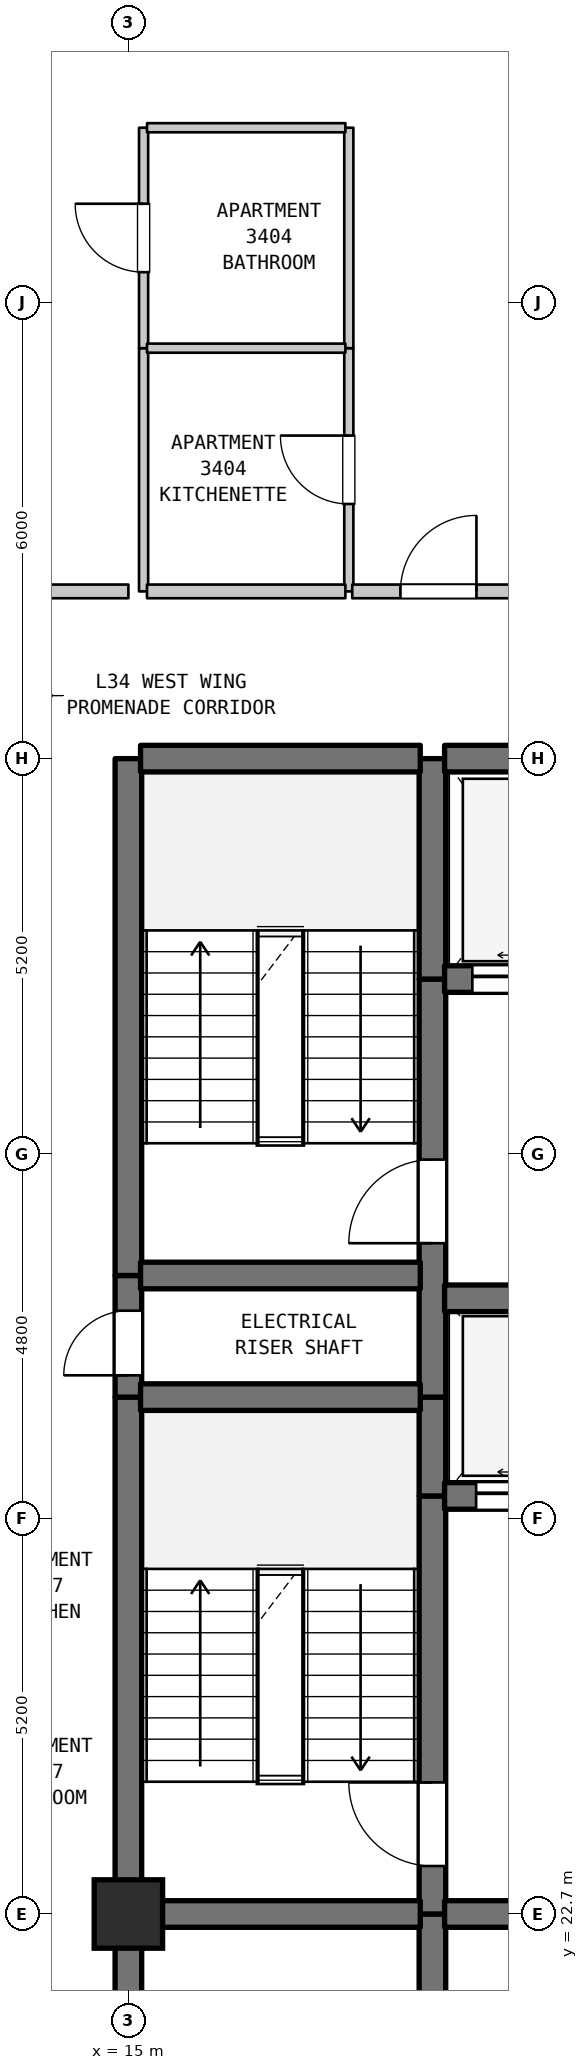
"""IFC4 building model, lengths in metres.
Left out: names, types, materials, properties, quantities, classifications, styles, units other than length and angle.
Written with IfcOpenShell. Run it as: python <this file> out.ifc"""

import sys

from ifc_helpers import new_model, si_unit, direction, frame, frame_2d, origin, origin_2d, place, context, subcontext, project, spatial, rectangle, extrude, element, fill, save


model = new_model("IFC4")
c1 = context("Model", 3, precision=1e-05, world=origin(), true_north=direction((0.0, 1.0)))
c2 = subcontext(c1, "Body", "Model", "MODEL_VIEW")
j1 = project(units=[si_unit("LENGTHUNIT", "METRE"), si_unit("PLANEANGLEUNIT", "RADIAN")], contexts=[c1])
p1 = place(None, origin())
s1 = spatial("IfcSite", under=j1, at=p1, CompositionType="ELEMENT")
p2 = place(p1, origin())
s2 = spatial("IfcBuilding", under=s1, at=p2, CompositionType="ELEMENT")
p3 = place(p2, frame((0.0, 0.0, 140.9)))
s3 = spatial("IfcBuildingStorey", under=s2, at=p3, CompositionType="ELEMENT", Elevation=140.9)
p4 = place(p3, frame((15.0, 22.7, 0.0), z_axis=(0.0, 0.0, 1.0), x_axis=(1.0, 0.0, 0.0)))
e1 = element("IfcColumn", 1, at=p4, inside=s3, PredefinedType="COLUMN", context=c2, shape_type="SweptSolid", body=[
    extrude(rectangle(XDim=0.9, YDim=0.9, at=origin_2d()), origin(), (0.0, 0.0, 1.0), 3.7),
])
p5 = place(p3, frame((15.0, 19.5, 0.0), z_axis=(0.0, 0.0, 1.0), x_axis=(0.0, 1.0, 0.0)))
e2 = element("IfcWall", 2, at=p5, inside=s3, PredefinedType="SHEAR", context=c2, shape_type="SweptSolid", body=[
    extrude(rectangle(XDim=3.2, YDim=0.35, at=frame_2d((1.6, 0.0))), origin(), (0.0, 0.0, 1.0), 3.385),
])
p6 = place(p3, frame((15.0, 22.7, 0.0), z_axis=(0.0, 0.0, 1.0), x_axis=(0.0, 1.0, 0.0)))
e3 = element("IfcWall", 3, at=p6, inside=s3, PredefinedType="SHEAR", context=c2, shape_type="SweptSolid", body=[
    extrude(rectangle(XDim=6.8, YDim=0.35, at=frame_2d((3.4, 0.0))), origin(), (0.0, 0.0, 1.0), 3.385),
])
p7 = place(p3, frame((15.0, 29.5, 0.0), z_axis=(0.0, 0.0, 1.0), x_axis=(0.0, 1.0, 0.0)))
e4 = element("IfcWall", 4, at=p7, inside=s3, PredefinedType="SHEAR", context=c2, shape_type="SweptSolid", body=[
    extrude(rectangle(XDim=1.6, YDim=0.35, at=frame_2d((0.8, 0.0))), origin(), (0.0, 0.0, 1.0), 3.385),
])
p8 = place(p7, frame((0.287, 0.0, 0.0)))
e5 = element("IfcOpeningElement", 5, at=p8, cuts=e4, PredefinedType="OPENING", context=c2, shape_type="SweptSolid", body=[
    extrude(rectangle(XDim=0.85, YDim=2.1, at=frame_2d((0.425, 1.05))), frame((0.0, 0.185, 0.0), z_axis=(0.0, -1.0, 0.0), x_axis=(1.0, 0.0, 0.0)), (0.0, 0.0, 1.0), 0.37),
])
p9 = place(p3, frame((15.0, 31.1, 0.0), z_axis=(0.0, 0.0, 1.0), x_axis=(0.0, 1.0, 0.0)))
e6 = element("IfcWall", 6, at=p9, inside=s3, PredefinedType="SHEAR", context=c2, shape_type="SweptSolid", body=[
    extrude(rectangle(XDim=6.8, YDim=0.35, at=frame_2d((3.4, 0.0))), origin(), (0.0, 0.0, 1.0), 3.385),
])
p10 = place(p3, frame((15.2, 40.1, 0.0), z_axis=(0.0, 0.0, 1.0), x_axis=(0.0, 1.0, 0.0)))
e7 = element("IfcWall", 7, at=p10, inside=s3, PredefinedType="PARTITIONING", context=c2, shape_type="SweptSolid", body=[
    extrude(rectangle(XDim=3.2, YDim=0.12, at=frame_2d((1.6, 0.0))), origin(), (0.0, 0.0, 1.0), 3.385),
])
p11 = place(p3, frame((15.2, 43.3, 0.0), z_axis=(0.0, 0.0, 1.0), x_axis=(0.0, 1.0, 0.0)))
e8 = element("IfcWall", 8, at=p11, inside=s3, PredefinedType="PARTITIONING", context=c2, shape_type="SweptSolid", body=[
    extrude(rectangle(XDim=2.9, YDim=0.12, at=frame_2d((1.45, 0.0))), origin(), (0.0, 0.0, 1.0), 3.385),
])
p12 = place(p11, frame((1.0, 0.0, 0.0)))
e9 = element("IfcOpeningElement", 9, at=p12, cuts=e8, PredefinedType="OPENING", context=c2, shape_type="SweptSolid", body=[
    extrude(rectangle(XDim=0.9, YDim=2.1, at=frame_2d((0.45, 1.05))), frame((0.0, 0.07, 0.0), z_axis=(0.0, -1.0, 0.0), x_axis=(1.0, 0.0, 0.0)), (0.0, 0.0, 1.0), 0.14),
])
p13 = place(p3, frame((17.9, 40.1, 0.0), z_axis=(0.0, 0.0, 1.0), x_axis=(0.0, 1.0, 0.0)))
e10 = element("IfcWall", 10, at=p13, inside=s3, PredefinedType="PARTITIONING", context=c2, shape_type="SweptSolid", body=[
    extrude(rectangle(XDim=3.2, YDim=0.12, at=frame_2d((1.6, 0.0))), origin(), (0.0, 0.0, 1.0), 3.385),
])
p14 = place(p13, frame((1.15, 0.0, 0.0)))
e11 = element("IfcOpeningElement", 11, at=p14, cuts=e10, PredefinedType="OPENING", context=c2, shape_type="SweptSolid", body=[
    extrude(rectangle(XDim=0.9, YDim=2.15, at=frame_2d((0.45, 1.075))), frame((0.0, 0.07, 0.0), z_axis=(0.0, -1.0, 0.0), x_axis=(1.0, 0.0, 0.0)), (0.0, 0.0, 1.0), 0.14),
])
p15 = place(p3, frame((17.9, 43.3, 0.0), z_axis=(0.0, 0.0, 1.0), x_axis=(0.0, 1.0, 0.0)))
e12 = element("IfcWall", 12, at=p15, inside=s3, PredefinedType="PARTITIONING", context=c2, shape_type="SweptSolid", body=[
    extrude(rectangle(XDim=2.9, YDim=0.12, at=frame_2d((1.45, 0.0))), origin(), (0.0, 0.0, 1.0), 3.385),
])
p16 = place(p3, frame((19.0, 19.5, 0.0), z_axis=(0.0, 0.0, 1.0), x_axis=(0.0, 1.0, 0.0)))
e13 = element("IfcWall", 13, at=p16, inside=s3, PredefinedType="SHEAR", context=c2, shape_type="SweptSolid", body=[
    extrude(rectangle(XDim=3.2, YDim=0.35, at=frame_2d((1.6, 0.0))), origin(), (0.0, 0.0, 1.0), 3.385),
])
p17 = place(p3, frame((19.0, 22.7, 0.0), z_axis=(0.0, 0.0, 1.0), x_axis=(0.0, 1.0, 0.0)))
e14 = element("IfcWall", 14, at=p17, inside=s3, PredefinedType="SHEAR", context=c2, shape_type="SweptSolid", body=[
    extrude(rectangle(XDim=5.5, YDim=0.35, at=frame_2d((2.75, 0.0))), origin(), (0.0, 0.0, 1.0), 3.385),
])
p18 = place(p17, frame((0.631, 0.0, 0.0)))
e15 = element("IfcOpeningElement", 15, at=p18, cuts=e14, PredefinedType="OPENING", context=c2, shape_type="SweptSolid", body=[
    extrude(rectangle(XDim=1.1, YDim=2.15, at=frame_2d((0.55, 1.075))), frame((0.0, 0.185, 0.0), z_axis=(0.0, -1.0, 0.0), x_axis=(1.0, 0.0, 0.0)), (0.0, 0.0, 1.0), 0.37),
])
p19 = place(p3, frame((19.0, 28.2, 0.0), z_axis=(0.0, 0.0, 1.0), x_axis=(0.0, 1.0, 0.0)))
e16 = element("IfcWall", 16, at=p19, inside=s3, PredefinedType="SHEAR", context=c2, shape_type="SweptSolid", body=[
    extrude(rectangle(XDim=1.3, YDim=0.35, at=frame_2d((0.65, 0.0))), origin(), (0.0, 0.0, 1.0), 3.385),
])
p20 = place(p3, frame((19.0, 29.5, 0.0), z_axis=(0.0, 0.0, 1.0), x_axis=(0.0, 1.0, 0.0)))
e17 = element("IfcWall", 17, at=p20, inside=s3, PredefinedType="SHEAR", context=c2, shape_type="SweptSolid", body=[
    extrude(rectangle(XDim=5.5, YDim=0.35, at=frame_2d((2.75, 0.0))), origin(), (0.0, 0.0, 1.0), 3.385),
])
p21 = place(p20, frame((2.025, 0.0, 0.0)))
e18 = element("IfcOpeningElement", 18, at=p21, cuts=e17, PredefinedType="OPENING", context=c2, shape_type="SweptSolid", body=[
    extrude(rectangle(XDim=1.1, YDim=2.15, at=frame_2d((0.55, 1.075))), frame((0.0, 0.185, 0.0), z_axis=(0.0, -1.0, 0.0), x_axis=(1.0, 0.0, 0.0)), (0.0, 0.0, 1.0), 0.37),
])
p22 = place(p3, frame((19.0, 35.0, 0.0), z_axis=(0.0, 0.0, 1.0), x_axis=(0.0, 1.0, 0.0)))
e19 = element("IfcWall", 19, at=p22, inside=s3, PredefinedType="SHEAR", context=c2, shape_type="SweptSolid", body=[
    extrude(rectangle(XDim=2.9, YDim=0.35, at=frame_2d((1.45, 0.0))), origin(), (0.0, 0.0, 1.0), 3.385),
])
p23 = place(p3, frame((15.16, 22.7, 0.0), z_axis=(0.0, 0.0, 1.0), x_axis=(1.0, 0.0, 0.0)))
e20 = element("IfcWall", 20, at=p23, inside=s3, PredefinedType="SHEAR", context=c2, shape_type="SweptSolid", body=[
    extrude(rectangle(XDim=3.68, YDim=0.35, at=frame_2d((1.84, 0.0))), origin(), (0.0, 0.0, 1.0), 3.385),
])
p24 = place(p3, frame((19.16, 22.7, 0.0), z_axis=(0.0, 0.0, 1.0), x_axis=(1.0, 0.0, 0.0)))
e21 = element("IfcWall", 21, at=p24, inside=s3, PredefinedType="SHEAR", context=c2, shape_type="SweptSolid", body=[
    extrude(rectangle(XDim=4.48, YDim=0.35, at=frame_2d((2.24, 0.0))), origin(), (0.0, 0.0, 1.0), 3.385),
])
p25 = place(p24, frame((1.64, 0.0, 0.0)))
e22 = element("IfcOpeningElement", 22, at=p25, cuts=e21, PredefinedType="OPENING", context=c2, shape_type="SweptSolid", body=[
    extrude(rectangle(XDim=1.2, YDim=2.2, at=frame_2d((0.6, 1.1))), frame((0.0, 0.185, 0.0), z_axis=(0.0, -1.0, 0.0), x_axis=(1.0, 0.0, 0.0)), (0.0, 0.0, 1.0), 0.37),
])
p26 = place(p3, frame((19.16, 28.2, 0.0), z_axis=(0.0, 0.0, 1.0), x_axis=(1.0, 0.0, 0.0)))
e23 = element("IfcWall", 23, at=p26, inside=s3, PredefinedType="SHEAR", context=c2, shape_type="SweptSolid", body=[
    extrude(rectangle(XDim=4.48, YDim=0.35, at=frame_2d((2.24, 0.0))), origin(), (0.0, 0.0, 1.0), 3.385),
])
p27 = place(p26, frame((0.415, 0.0, 0.0)))
e24 = element("IfcOpeningElement", 24, at=p27, cuts=e23, PredefinedType="OPENING", context=c2, shape_type="SweptSolid", body=[
    extrude(rectangle(XDim=1.25, YDim=2.2, at=frame_2d((0.625, 1.1))), frame((0.0, 0.185, 0.0), z_axis=(0.0, -1.0, 0.0), x_axis=(1.0, 0.0, 0.0)), (0.0, 0.0, 1.0), 0.37),
])
p28 = place(p26, frame((2.815, 0.0, 0.0)))
e25 = element("IfcOpeningElement", 25, at=p28, cuts=e23, PredefinedType="OPENING", context=c2, shape_type="SweptSolid", body=[
    extrude(rectangle(XDim=1.25, YDim=2.2, at=frame_2d((0.625, 1.1))), frame((0.0, 0.185, 0.0), z_axis=(0.0, -1.0, 0.0), x_axis=(1.0, 0.0, 0.0)), (0.0, 0.0, 1.0), 0.37),
])
p29 = place(p3, frame((15.16, 29.5, 0.0), z_axis=(0.0, 0.0, 1.0), x_axis=(1.0, 0.0, 0.0)))
e26 = element("IfcWall", 26, at=p29, inside=s3, PredefinedType="SHEAR", context=c2, shape_type="SweptSolid", body=[
    extrude(rectangle(XDim=3.68, YDim=0.35, at=frame_2d((1.84, 0.0))), origin(), (0.0, 0.0, 1.0), 3.385),
])
p30 = place(p3, frame((19.16, 30.8, 0.0), z_axis=(0.0, 0.0, 1.0), x_axis=(1.0, 0.0, 0.0)))
e27 = element("IfcWall", 27, at=p30, inside=s3, PredefinedType="SHEAR", context=c2, shape_type="SweptSolid", body=[
    extrude(rectangle(XDim=4.48, YDim=0.35, at=frame_2d((2.24, 0.0))), origin(), (0.0, 0.0, 1.0), 3.385),
])
p31 = place(p3, frame((15.16, 31.1, 0.0), z_axis=(0.0, 0.0, 1.0), x_axis=(1.0, 0.0, 0.0)))
e28 = element("IfcWall", 28, at=p31, inside=s3, PredefinedType="SHEAR", context=c2, shape_type="SweptSolid", body=[
    extrude(rectangle(XDim=3.68, YDim=0.35, at=frame_2d((1.84, 0.0))), origin(), (0.0, 0.0, 1.0), 3.385),
])
p32 = place(p3, frame((19.16, 35.0, 0.0), z_axis=(0.0, 0.0, 1.0), x_axis=(1.0, 0.0, 0.0)))
e29 = element("IfcWall", 29, at=p32, inside=s3, PredefinedType="SHEAR", context=c2, shape_type="SweptSolid", body=[
    extrude(rectangle(XDim=4.48, YDim=0.35, at=frame_2d((2.24, 0.0))), origin(), (0.0, 0.0, 1.0), 3.385),
])
p33 = place(p32, frame((0.365, 0.0, 0.0)))
e30 = element("IfcOpeningElement", 30, at=p33, cuts=e29, PredefinedType="OPENING", context=c2, shape_type="SweptSolid", body=[
    extrude(rectangle(XDim=1.35, YDim=2.2, at=frame_2d((0.675, 1.1))), frame((0.0, 0.185, 0.0), z_axis=(0.0, -1.0, 0.0), x_axis=(1.0, 0.0, 0.0)), (0.0, 0.0, 1.0), 0.37),
])
p34 = place(p32, frame((2.765, 0.0, 0.0)))
e31 = element("IfcOpeningElement", 31, at=p34, cuts=e29, PredefinedType="OPENING", context=c2, shape_type="SweptSolid", body=[
    extrude(rectangle(XDim=1.35, YDim=2.2, at=frame_2d((0.675, 1.1))), frame((0.0, 0.185, 0.0), z_axis=(0.0, -1.0, 0.0), x_axis=(1.0, 0.0, 0.0)), (0.0, 0.0, 1.0), 0.37),
])
p35 = place(p3, frame((15.16, 37.9, 0.0), z_axis=(0.0, 0.0, 1.0), x_axis=(1.0, 0.0, 0.0)))
e32 = element("IfcWall", 32, at=p35, inside=s3, PredefinedType="SHEAR", context=c2, shape_type="SweptSolid", body=[
    extrude(rectangle(XDim=3.68, YDim=0.35, at=frame_2d((1.84, 0.0))), origin(), (0.0, 0.0, 1.0), 3.385),
])
p36 = place(p3, frame((19.16, 37.9, 0.0), z_axis=(0.0, 0.0, 1.0), x_axis=(1.0, 0.0, 0.0)))
e33 = element("IfcWall", 33, at=p36, inside=s3, PredefinedType="SHEAR", context=c2, shape_type="SweptSolid", body=[
    extrude(rectangle(XDim=4.48, YDim=0.35, at=frame_2d((2.24, 0.0))), origin(), (0.0, 0.0, 1.0), 3.385),
])
p37 = place(p3, frame((12.875, 40.1, 0.0), z_axis=(0.0, 0.0, 1.0), x_axis=(1.0, 0.0, 0.0)))
e34 = element("IfcWall", 34, at=p37, inside=s3, PredefinedType="STANDARD", context=c2, shape_type="SweptSolid", body=[
    extrude(rectangle(XDim=2.125, YDim=0.18, at=frame_2d((1.062, 0.0))), origin(), (0.0, 0.0, 1.0), 3.385),
])
p38 = place(p3, frame((15.245, 40.1, 0.0), z_axis=(0.0, 0.0, 1.0), x_axis=(1.0, 0.0, 0.0)))
e35 = element("IfcWall", 35, at=p38, inside=s3, PredefinedType="STANDARD", context=c2, shape_type="SweptSolid", body=[
    extrude(rectangle(XDim=2.61, YDim=0.18, at=frame_2d((1.305, 0.0))), origin(), (0.0, 0.0, 1.0), 3.385),
])
p39 = place(p3, frame((17.945, 40.1, 0.0), z_axis=(0.0, 0.0, 1.0), x_axis=(1.0, 0.0, 0.0)))
e36 = element("IfcWall", 36, at=p39, inside=s3, PredefinedType="STANDARD", context=c2, shape_type="SweptSolid", body=[
    extrude(rectangle(XDim=2.41, YDim=0.18, at=frame_2d((1.205, 0.0))), origin(), (0.0, 0.0, 1.0), 3.385),
])
p40 = place(p39, frame((0.634, 0.0, 0.0)))
e37 = element("IfcOpeningElement", 37, at=p40, cuts=e36, PredefinedType="OPENING", context=c2, shape_type="SweptSolid", body=[
    extrude(rectangle(XDim=1.0, YDim=2.15, at=frame_2d((0.5, 1.075))), frame((0.0, 0.1, 0.0), z_axis=(0.0, -1.0, 0.0), x_axis=(1.0, 0.0, 0.0)), (0.0, 0.0, 1.0), 0.2),
])
for number, where, z_axis, x_axis in (
    (38, (15.245, 43.3, 0.0), (0.0, 0.0, 1.0), (1.0, 0.0, 0.0)),
    (39, (15.245, 46.2, 0.0), (0.0, 0.0, 1.0), (1.0, 0.0, 0.0)),
):
    element("IfcWall", number, at=place(p3, frame(where, z_axis=z_axis, x_axis=x_axis)), inside=s3, PredefinedType="PARTITIONING", context=c2, shape_type="SweptSolid", body=[
        extrude(rectangle(XDim=2.61, YDim=0.12, at=frame_2d((1.305, 0.0))), origin(), (0.0, 0.0, 1.0), 3.385),
    ])
p41 = place(p8, origin())
e40 = element("IfcDoor", 40, at=p41, inside=s3, OperationType="SINGLE_SWING_LEFT", PredefinedType="DOOR", context=c2, shape_type="SweptSolid", body=[
    extrude(rectangle(XDim=0.85, YDim=2.1, at=frame_2d((0.425, 1.05))), frame((0.0, 0.025, 0.0), z_axis=(0.0, -1.0, 0.0), x_axis=(1.0, 0.0, 0.0)), (0.0, 0.0, 1.0), 0.05),
])
fill(e5, e40)
p42 = place(p12, origin())
e41 = element("IfcDoor", 41, at=p42, inside=s3, OperationType="SINGLE_SWING_RIGHT", PredefinedType="DOOR", context=c2, shape_type="SweptSolid", body=[
    extrude(rectangle(XDim=0.9, YDim=2.1, at=frame_2d((0.45, 1.05))), frame((0.0, 0.025, 0.0), z_axis=(0.0, -1.0, 0.0), x_axis=(1.0, 0.0, 0.0)), (0.0, 0.0, 1.0), 0.05),
])
fill(e9, e41)
p43 = place(p14, origin())
e42 = element("IfcDoor", 42, at=p43, inside=s3, OperationType="SINGLE_SWING_RIGHT", PredefinedType="DOOR", context=c2, shape_type="SweptSolid", body=[
    extrude(rectangle(XDim=0.9, YDim=2.15, at=frame_2d((0.45, 1.075))), frame((0.0, 0.025, 0.0), z_axis=(0.0, -1.0, 0.0), x_axis=(1.0, 0.0, 0.0)), (0.0, 0.0, 1.0), 0.05),
])
fill(e11, e42)
p44 = place(p18, origin())
e43 = element("IfcDoor", 43, at=p44, inside=s3, OperationType="SINGLE_SWING_RIGHT", PredefinedType="DOOR", context=c2, shape_type="SweptSolid", body=[
    extrude(rectangle(XDim=1.1, YDim=2.15, at=frame_2d((0.55, 1.075))), frame((0.0, 0.025, 0.0), z_axis=(0.0, -1.0, 0.0), x_axis=(1.0, 0.0, 0.0)), (0.0, 0.0, 1.0), 0.05),
])
fill(e15, e43)
p45 = place(p21, origin())
e44 = element("IfcDoor", 44, at=p45, inside=s3, OperationType="SINGLE_SWING_LEFT", PredefinedType="DOOR", context=c2, shape_type="SweptSolid", body=[
    extrude(rectangle(XDim=1.1, YDim=2.15, at=frame_2d((0.55, 1.075))), frame((0.0, 0.025, 0.0), z_axis=(0.0, -1.0, 0.0), x_axis=(1.0, 0.0, 0.0)), (0.0, 0.0, 1.0), 0.05),
])
fill(e18, e44)
p46 = place(p27, origin())
e45 = element("IfcDoor", 45, at=p46, inside=s3, OperationType="DOUBLE_DOOR_SLIDING", PredefinedType="DOOR", context=c2, shape_type="SweptSolid", body=[
    extrude(rectangle(XDim=1.25, YDim=2.2, at=frame_2d((0.625, 1.1))), frame((0.0, 0.025, 0.0), z_axis=(0.0, -1.0, 0.0), x_axis=(1.0, 0.0, 0.0)), (0.0, 0.0, 1.0), 0.05),
])
fill(e24, e45)
p47 = place(p33, origin())
e46 = element("IfcDoor", 46, at=p47, inside=s3, OperationType="DOUBLE_DOOR_SLIDING", PredefinedType="DOOR", context=c2, shape_type="SweptSolid", body=[
    extrude(rectangle(XDim=1.35, YDim=2.2, at=frame_2d((0.675, 1.1))), frame((0.0, 0.025, 0.0), z_axis=(0.0, -1.0, 0.0), x_axis=(1.0, 0.0, 0.0)), (0.0, 0.0, 1.0), 0.05),
])
fill(e30, e46)
p48 = place(p40, origin())
e47 = element("IfcDoor", 47, at=p48, inside=s3, OperationType="SINGLE_SWING_RIGHT", PredefinedType="DOOR", context=c2, shape_type="SweptSolid", body=[
    extrude(rectangle(XDim=1.0, YDim=2.15, at=frame_2d((0.5, 1.075))), frame((0.0, 0.025, 0.0), z_axis=(0.0, -1.0, 0.0), x_axis=(1.0, 0.0, 0.0)), (0.0, 0.0, 1.0), 0.05),
])
fill(e37, e47)
save(model, sys.argv[1])
